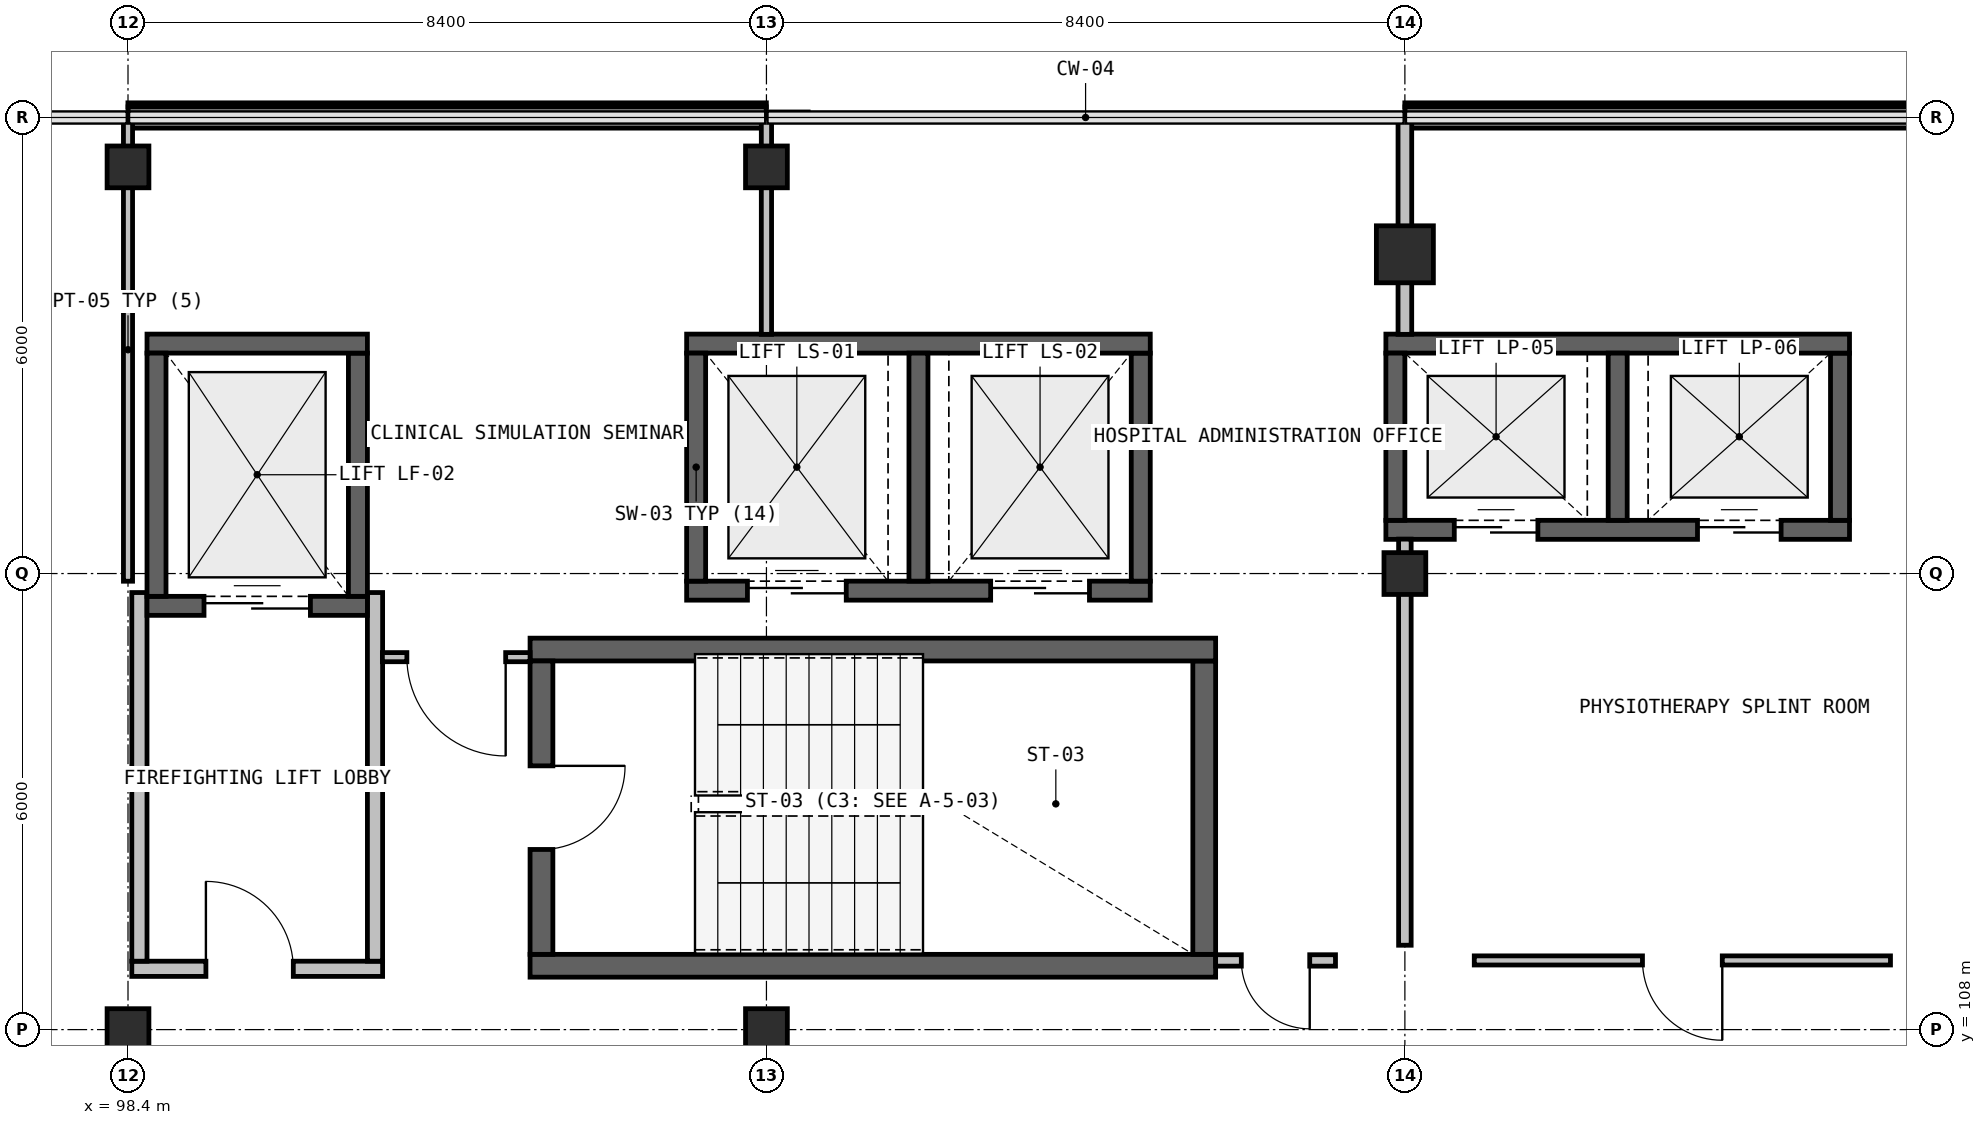
"""IFC4 building model, lengths in metres.
Left out: names, types, materials, properties, quantities, classifications, styles, units other than length and angle.
Written with IfcOpenShell. Run it as: python <this file> out.ifc"""

import sys

from ifc_helpers import new_model, si_unit, direction, frame, frame_2d, origin, origin_2d, place, context, subcontext, project, spatial, rectangle, extrude, element, fill, save


model = new_model("IFC4")
c1 = context("Model", 3, precision=1e-05, world=origin(), true_north=direction((0.0, 1.0)))
c2 = subcontext(c1, "Body", "Model", "MODEL_VIEW")
j1 = project(units=[si_unit("LENGTHUNIT", "METRE"), si_unit("PLANEANGLEUNIT", "RADIAN")], contexts=[c1])
p1 = place(None, origin())
s1 = spatial("IfcSite", under=j1, at=p1, CompositionType="ELEMENT")
p2 = place(p1, origin())
s2 = spatial("IfcBuilding", under=s1, at=p2, CompositionType="ELEMENT")
p3 = place(p2, frame((0.0, 0.0, 31.35)))
s3 = spatial("IfcBuildingStorey", under=s2, at=p3, CompositionType="ELEMENT", Elevation=31.35)
p4 = place(p3, frame((115.2, 118.2, 0.0), z_axis=(0.0, 0.0, 1.0), x_axis=(1.0, 0.0, 0.0)))
e1 = element("IfcColumn", 1, at=p4, inside=s3, PredefinedType="COLUMN", context=c2, shape_type="SweptSolid", body=[
    extrude(rectangle(XDim=0.75, YDim=0.75, at=origin_2d()), origin(), (0.0, 0.0, 1.0), 4.05),
])
for number, where, z_axis, x_axis in (
    (2, (98.4, 108.0, 0.0), (0.0, 0.0, 1.0), (1.0, 0.0, 0.0)),
    (3, (98.4, 119.35, 0.0), (0.0, 0.0, 1.0), (1.0, 0.0, 0.0)),
    (4, (106.8, 108.0, 0.0), (0.0, 0.0, 1.0), (1.0, 0.0, 0.0)),
    (5, (106.8, 119.35, 0.0), (0.0, 0.0, 1.0), (1.0, 0.0, 0.0)),
    (6, (115.2, 114.0, 0.0), (0.0, 0.0, 1.0), (1.0, 0.0, 0.0)),
):
    element("IfcColumn", number, at=place(p3, frame(where, z_axis=z_axis, x_axis=x_axis)), inside=s3, PredefinedType="COLUMN", context=c2, shape_type="SweptSolid", body=[
        extrude(rectangle(XDim=0.55, YDim=0.55, at=origin_2d()), origin(), (0.0, 0.0, 1.0), 4.05),
    ])
p5 = place(p3, frame((98.401, 120.0, 0.0), z_axis=(0.0, 0.0, 1.0), x_axis=(1.0, 0.0, 0.0)))
e7 = element("IfcWall", 7, at=p5, inside=s3, PredefinedType="SOLIDWALL", context=c2, shape_type="SweptSolid", body=[
    extrude(rectangle(XDim=8.396, YDim=0.28, at=frame_2d((4.198, 0.0))), origin(), (0.0, 0.0, 1.0), 0.94),
])
p6 = place(p3, frame((115.201, 120.0, 0.0), z_axis=(0.0, 0.0, 1.0), x_axis=(1.0, 0.0, 0.0)))
e8 = element("IfcWall", 8, at=p6, inside=s3, PredefinedType="SOLIDWALL", context=c2, shape_type="SweptSolid", body=[
    extrude(rectangle(XDim=8.396, YDim=0.28, at=frame_2d((4.198, 0.0))), origin(), (0.0, 0.0, 1.0), 0.94),
])
p7 = place(p3, frame((98.45, 108.8, 0.0), z_axis=(0.0, 0.0, 1.0), x_axis=(1.0, 0.0, 0.0)))
e9 = element("IfcWall", 9, at=p7, inside=s3, PredefinedType="SOLIDWALL", context=c2, shape_type="SweptSolid", body=[
    extrude(rectangle(XDim=3.3, YDim=0.2, at=frame_2d((1.65, 0.0))), origin(), (0.0, 0.0, 1.0), 3.785),
])
p8 = place(p7, frame((0.975, 0.0, 0.0)))
e10 = element("IfcOpeningElement", 10, at=p8, cuts=e9, PredefinedType="OPENING", context=c2, shape_type="SweptSolid", body=[
    extrude(rectangle(XDim=1.15, YDim=2.15, at=frame_2d((0.575, 1.075))), frame((0.0, 0.11, 0.0), z_axis=(0.0, -1.0, 0.0), x_axis=(1.0, 0.0, 0.0)), (0.0, 0.0, 1.0), 0.22),
])
p9 = place(p3, frame((101.65, 108.9, 0.0), z_axis=(0.0, 0.0, 1.0), x_axis=(0.0, 1.0, 0.0)))
e11 = element("IfcWall", 11, at=p9, inside=s3, PredefinedType="SOLIDWALL", context=c2, shape_type="SweptSolid", body=[
    extrude(rectangle(XDim=4.85, YDim=0.2, at=frame_2d((2.425, 0.0))), origin(), (0.0, 0.0, 1.0), 3.785),
])
p10 = place(p3, frame((98.55, 113.75, 0.0), z_axis=(0.0, 0.0, 1.0), x_axis=(0.0, -1.0, 0.0)))
e12 = element("IfcWall", 12, at=p10, inside=s3, PredefinedType="SOLIDWALL", context=c2, shape_type="SweptSolid", body=[
    extrude(rectangle(XDim=4.85, YDim=0.2, at=frame_2d((2.425, 0.0))), origin(), (0.0, 0.0, 1.0), 3.185),
])
p11 = place(p3, frame((103.69, 108.84, 0.0), z_axis=(0.0, 0.0, 1.0), x_axis=(1.0, 0.0, 0.0)))
e13 = element("IfcWall", 13, at=p11, inside=s3, PredefinedType="SHEAR", context=c2, shape_type="SweptSolid", body=[
    extrude(rectangle(XDim=9.02, YDim=0.3, at=frame_2d((4.51, 0.0))), origin(), (0.0, 0.0, 1.0), 3.785),
])
p12 = place(p3, frame((112.56, 108.99, 0.0), z_axis=(0.0, 0.0, 1.0), x_axis=(0.0, 1.0, 0.0)))
e14 = element("IfcWall", 14, at=p12, inside=s3, PredefinedType="SHEAR", context=c2, shape_type="SweptSolid", body=[
    extrude(rectangle(XDim=3.86, YDim=0.3, at=frame_2d((1.93, 0.0))), origin(), (0.0, 0.0, 1.0), 3.785),
])
p13 = place(p3, frame((112.71, 113.0, 0.0), z_axis=(0.0, 0.0, 1.0), x_axis=(-1.0, 0.0, 0.0)))
e15 = element("IfcWall", 15, at=p13, inside=s3, PredefinedType="SHEAR", context=c2, shape_type="SweptSolid", body=[
    extrude(rectangle(XDim=9.02, YDim=0.3, at=frame_2d((4.51, 0.0))), origin(), (0.0, 0.0, 1.0), 3.785),
])
p14 = place(p3, frame((103.84, 112.85, 0.0), z_axis=(0.0, 0.0, 1.0), x_axis=(0.0, -1.0, 0.0)))
e16 = element("IfcWall", 16, at=p14, inside=s3, PredefinedType="SHEAR", context=c2, shape_type="SweptSolid", body=[
    extrude(rectangle(XDim=3.86, YDim=0.3, at=frame_2d((1.93, 0.0))), origin(), (0.0, 0.0, 1.0), 3.785),
])
p15 = place(p14, frame((1.38, 0.0, 0.0)))
e17 = element("IfcOpeningElement", 17, at=p15, cuts=e16, PredefinedType="OPENING", context=c2, shape_type="SweptSolid", body=[
    extrude(rectangle(XDim=1.1, YDim=2.15, at=frame_2d((0.55, 1.075))), frame((0.0, 0.16, 0.0), z_axis=(0.0, -1.0, 0.0), x_axis=(1.0, 0.0, 0.0)), (0.0, 0.0, 1.0), 0.32),
])
p16 = place(p3, frame((98.65, 113.575, 0.0), z_axis=(0.0, 0.0, 1.0), x_axis=(1.0, 0.0, 0.0)))
e18 = element("IfcWall", 18, at=p16, inside=s3, PredefinedType="SHEAR", context=c2, shape_type="SweptSolid", body=[
    extrude(rectangle(XDim=2.9, YDim=0.25, at=frame_2d((1.45, 0.0))), origin(), (0.0, 0.0, 1.0), 3.785),
])
p17 = place(p16, frame((0.75, 0.0, 0.0)))
e19 = element("IfcOpeningElement", 19, at=p17, cuts=e18, PredefinedType="OPENING", context=c2, shape_type="SweptSolid", body=[
    extrude(rectangle(XDim=1.4, YDim=2.15, at=frame_2d((0.7, 1.075))), frame((0.0, 0.135, 0.0), z_axis=(0.0, -1.0, 0.0), x_axis=(1.0, 0.0, 0.0)), (0.0, 0.0, 1.0), 0.27),
])
p18 = place(p3, frame((101.425, 113.7, 0.0), z_axis=(0.0, 0.0, 1.0), x_axis=(0.0, 1.0, 0.0)))
e20 = element("IfcWall", 20, at=p18, inside=s3, PredefinedType="SHEAR", context=c2, shape_type="SweptSolid", body=[
    extrude(rectangle(XDim=3.2, YDim=0.25, at=frame_2d((1.6, 0.0))), origin(), (0.0, 0.0, 1.0), 3.785),
])
p19 = place(p3, frame((101.55, 117.025, 0.0), z_axis=(0.0, 0.0, 1.0), x_axis=(-1.0, 0.0, 0.0)))
e21 = element("IfcWall", 21, at=p19, inside=s3, PredefinedType="SHEAR", context=c2, shape_type="SweptSolid", body=[
    extrude(rectangle(XDim=2.9, YDim=0.25, at=frame_2d((1.45, 0.0))), origin(), (0.0, 0.0, 1.0), 3.785),
])
p20 = place(p3, frame((98.775, 116.9, 0.0), z_axis=(0.0, 0.0, 1.0), x_axis=(0.0, -1.0, 0.0)))
e22 = element("IfcWall", 22, at=p20, inside=s3, PredefinedType="SHEAR", context=c2, shape_type="SweptSolid", body=[
    extrude(rectangle(XDim=3.2, YDim=0.25, at=frame_2d((1.6, 0.0))), origin(), (0.0, 0.0, 1.0), 3.785),
])
p21 = place(p3, frame((105.75, 113.775, 0.0), z_axis=(0.0, 0.0, 1.0), x_axis=(1.0, 0.0, 0.0)))
e23 = element("IfcWall", 23, at=p21, inside=s3, PredefinedType="SHEAR", context=c2, shape_type="SweptSolid", body=[
    extrude(rectangle(XDim=6.1, YDim=0.25, at=frame_2d((3.05, 0.0))), origin(), (0.0, 0.0, 1.0), 3.785),
])
p22 = place(p21, frame((0.8, 0.0, 0.0)))
e24 = element("IfcOpeningElement", 24, at=p22, cuts=e23, PredefinedType="OPENING", context=c2, shape_type="SweptSolid", body=[
    extrude(rectangle(XDim=1.3, YDim=2.15, at=frame_2d((0.65, 1.075))), frame((0.0, 0.135, 0.0), z_axis=(0.0, -1.0, 0.0), x_axis=(1.0, 0.0, 0.0)), (0.0, 0.0, 1.0), 0.27),
])
p23 = place(p21, frame((4.0, 0.0, 0.0)))
e25 = element("IfcOpeningElement", 25, at=p23, cuts=e23, PredefinedType="OPENING", context=c2, shape_type="SweptSolid", body=[
    extrude(rectangle(XDim=1.3, YDim=2.15, at=frame_2d((0.65, 1.075))), frame((0.0, 0.135, 0.0), z_axis=(0.0, -1.0, 0.0), x_axis=(1.0, 0.0, 0.0)), (0.0, 0.0, 1.0), 0.27),
])
p24 = place(p3, frame((111.725, 113.9, 0.0), z_axis=(0.0, 0.0, 1.0), x_axis=(0.0, 1.0, 0.0)))
e26 = element("IfcWall", 26, at=p24, inside=s3, PredefinedType="SHEAR", context=c2, shape_type="SweptSolid", body=[
    extrude(rectangle(XDim=3.0, YDim=0.25, at=frame_2d((1.5, 0.0))), origin(), (0.0, 0.0, 1.0), 3.785),
])
p25 = place(p3, frame((111.85, 117.025, 0.0), z_axis=(0.0, 0.0, 1.0), x_axis=(-1.0, 0.0, 0.0)))
e27 = element("IfcWall", 27, at=p25, inside=s3, PredefinedType="SHEAR", context=c2, shape_type="SweptSolid", body=[
    extrude(rectangle(XDim=6.1, YDim=0.25, at=frame_2d((3.05, 0.0))), origin(), (0.0, 0.0, 1.0), 3.785),
])
for number, where, z_axis, x_axis in (
    (28, (105.875, 116.9, 0.0), (0.0, 0.0, 1.0), (0.0, -1.0, 0.0)),
    (29, (108.8, 113.9, 0.0), (0.0, 0.0, 1.0), (0.0, 1.0, 0.0)),
):
    element("IfcWall", number, at=place(p3, frame(where, z_axis=z_axis, x_axis=x_axis)), inside=s3, PredefinedType="SHEAR", context=c2, shape_type="SweptSolid", body=[
        extrude(rectangle(XDim=3.0, YDim=0.25, at=frame_2d((1.5, 0.0))), origin(), (0.0, 0.0, 1.0), 3.785),
    ])
p26 = place(p3, frame((114.95, 114.575, 0.0), z_axis=(0.0, 0.0, 1.0), x_axis=(1.0, 0.0, 0.0)))
e30 = element("IfcWall", 30, at=p26, inside=s3, PredefinedType="SHEAR", context=c2, shape_type="SweptSolid", body=[
    extrude(rectangle(XDim=6.1, YDim=0.25, at=frame_2d((3.05, 0.0))), origin(), (0.0, 0.0, 1.0), 3.785),
])
p27 = place(p26, frame((0.9, 0.0, 0.0)))
e31 = element("IfcOpeningElement", 31, at=p27, cuts=e30, PredefinedType="OPENING", context=c2, shape_type="SweptSolid", body=[
    extrude(rectangle(XDim=1.1, YDim=2.15, at=frame_2d((0.55, 1.075))), frame((0.0, 0.135, 0.0), z_axis=(0.0, -1.0, 0.0), x_axis=(1.0, 0.0, 0.0)), (0.0, 0.0, 1.0), 0.27),
])
p28 = place(p26, frame((4.1, 0.0, 0.0)))
e32 = element("IfcOpeningElement", 32, at=p28, cuts=e30, PredefinedType="OPENING", context=c2, shape_type="SweptSolid", body=[
    extrude(rectangle(XDim=1.1, YDim=2.15, at=frame_2d((0.55, 1.075))), frame((0.0, 0.135, 0.0), z_axis=(0.0, -1.0, 0.0), x_axis=(1.0, 0.0, 0.0)), (0.0, 0.0, 1.0), 0.27),
])
p29 = place(p3, frame((120.925, 114.7, 0.0), z_axis=(0.0, 0.0, 1.0), x_axis=(0.0, 1.0, 0.0)))
e33 = element("IfcWall", 33, at=p29, inside=s3, PredefinedType="SHEAR", context=c2, shape_type="SweptSolid", body=[
    extrude(rectangle(XDim=2.2, YDim=0.25, at=frame_2d((1.1, 0.0))), origin(), (0.0, 0.0, 1.0), 3.785),
])
p30 = place(p3, frame((121.05, 117.025, 0.0), z_axis=(0.0, 0.0, 1.0), x_axis=(-1.0, 0.0, 0.0)))
e34 = element("IfcWall", 34, at=p30, inside=s3, PredefinedType="SHEAR", context=c2, shape_type="SweptSolid", body=[
    extrude(rectangle(XDim=6.1, YDim=0.25, at=frame_2d((3.05, 0.0))), origin(), (0.0, 0.0, 1.0), 3.785),
])
for number, where, z_axis, x_axis in (
    (35, (115.075, 116.9, 0.0), (0.0, 0.0, 1.0), (0.0, -1.0, 0.0)),
    (36, (118.0, 114.7, 0.0), (0.0, 0.0, 1.0), (0.0, 1.0, 0.0)),
):
    element("IfcWall", number, at=place(p3, frame(where, z_axis=z_axis, x_axis=x_axis)), inside=s3, PredefinedType="SHEAR", context=c2, shape_type="SweptSolid", body=[
        extrude(rectangle(XDim=2.2, YDim=0.25, at=frame_2d((1.1, 0.0))), origin(), (0.0, 0.0, 1.0), 3.785),
    ])
p31 = place(p3, frame((98.4, 119.99, 0.0), z_axis=(0.0, 0.0, 1.0), x_axis=(0.0, -1.0, 0.0)))
e37 = element("IfcWall", 37, at=p31, inside=s3, PredefinedType="PARTITIONING", context=c2, shape_type="SweptSolid", body=[
    extrude(rectangle(XDim=6.091, YDim=0.12, at=frame_2d((3.045, 0.0))), origin(), (0.0, 0.0, 1.0), 3.185),
])
p32 = place(p3, frame((106.8, 119.99, 0.0), z_axis=(0.0, 0.0, 1.0), x_axis=(0.0, -1.0, 0.0)))
e38 = element("IfcWall", 38, at=p32, inside=s3, PredefinedType="PARTITIONING", context=c2, shape_type="SweptSolid", body=[
    extrude(rectangle(XDim=2.843, YDim=0.135, at=frame_2d((1.421, 0.0))), origin(), (0.0, 0.0, 1.0), 3.785),
])
p33 = place(p3, frame((103.69, 112.9, 0.0), z_axis=(0.0, 0.0, 1.0), x_axis=(-1.0, 0.0, 0.0)))
e39 = element("IfcWall", 39, at=p33, inside=s3, PredefinedType="PARTITIONING", context=c2, shape_type="SweptSolid", body=[
    extrude(rectangle(XDim=1.943, YDim=0.12, at=frame_2d((0.971, 0.0))), origin(), (0.0, 0.0, 1.0), 3.785),
])
p34 = place(p33, frame((0.321, 0.0, 0.0)))
e40 = element("IfcOpeningElement", 40, at=p34, cuts=e39, PredefinedType="OPENING", context=c2, shape_type="SweptSolid", body=[
    extrude(rectangle(XDim=1.3, YDim=2.15, at=frame_2d((0.65, 1.075))), frame((0.0, 0.07, 0.0), z_axis=(0.0, -1.0, 0.0), x_axis=(1.0, 0.0, 0.0)), (0.0, 0.0, 1.0), 0.14),
])
p35 = place(p3, frame((115.2, 119.99, 0.0), z_axis=(0.0, 0.0, 1.0), x_axis=(0.0, -1.0, 0.0)))
e41 = element("IfcWall", 41, at=p35, inside=s3, PredefinedType="PARTITIONING", context=c2, shape_type="SweptSolid", body=[
    extrude(rectangle(XDim=2.843, YDim=0.18, at=frame_2d((1.421, 0.0))), origin(), (0.0, 0.0, 1.0), 3.785),
])
p36 = place(p3, frame((115.2, 114.453, 0.0), z_axis=(0.0, 0.0, 1.0), x_axis=(0.0, -1.0, 0.0)))
e42 = element("IfcWall", 42, at=p36, inside=s3, PredefinedType="PARTITIONING", context=c2, shape_type="SweptSolid", body=[
    extrude(rectangle(XDim=5.343, YDim=0.165, at=frame_2d((2.671, 0.0))), origin(), (0.0, 0.0, 1.0), 3.185),
])
p37 = place(p3, frame((114.287, 108.91, 0.0), z_axis=(0.0, 0.0, 1.0), x_axis=(-1.0, 0.0, 0.0)))
e43 = element("IfcWall", 43, at=p37, inside=s3, PredefinedType="PARTITIONING", context=c2, shape_type="SweptSolid", body=[
    extrude(rectangle(XDim=1.577, YDim=0.15, at=frame_2d((0.789, 0.0))), origin(), (0.0, 0.0, 1.0), 3.785),
])
p38 = place(p37, frame((0.339, 0.0, 0.0)))
e44 = element("IfcOpeningElement", 44, at=p38, cuts=e43, PredefinedType="OPENING", context=c2, shape_type="SweptSolid", body=[
    extrude(rectangle(XDim=0.9, YDim=2.1, at=frame_2d((0.45, 1.05))), frame((0.0, 0.085, 0.0), z_axis=(0.0, -1.0, 0.0), x_axis=(1.0, 0.0, 0.0)), (0.0, 0.0, 1.0), 0.17),
])
p39 = place(p3, frame((121.589, 108.91, 0.0), z_axis=(0.0, 0.0, 1.0), x_axis=(-1.0, 0.0, 0.0)))
e45 = element("IfcWall", 45, at=p39, inside=s3, PredefinedType="PARTITIONING", context=c2, shape_type="SweptSolid", body=[
    extrude(rectangle(XDim=5.476, YDim=0.12, at=frame_2d((2.738, 0.0))), origin(), (0.0, 0.0, 1.0), 3.785),
])
p40 = place(p39, frame((2.213, 0.0, 0.0)))
e46 = element("IfcOpeningElement", 46, at=p40, cuts=e45, PredefinedType="OPENING", context=c2, shape_type="SweptSolid", body=[
    extrude(rectangle(XDim=1.05, YDim=2.15, at=frame_2d((0.525, 1.075))), frame((0.0, 0.07, 0.0), z_axis=(0.0, -1.0, 0.0), x_axis=(1.0, 0.0, 0.0)), (0.0, 0.0, 1.0), 0.14),
])
p41 = place(p8, origin())
e47 = element("IfcDoor", 47, at=p41, inside=s3, OperationType="SINGLE_SWING_LEFT", PredefinedType="DOOR", context=c2, shape_type="SweptSolid", body=[
    extrude(rectangle(XDim=1.15, YDim=2.15, at=frame_2d((0.575, 1.075))), frame((0.0, 0.025, 0.0), z_axis=(0.0, -1.0, 0.0), x_axis=(1.0, 0.0, 0.0)), (0.0, 0.0, 1.0), 0.05),
])
fill(e10, e47)
p42 = place(p15, origin())
e48 = element("IfcDoor", 48, at=p42, inside=s3, OperationType="SINGLE_SWING_LEFT", PredefinedType="DOOR", context=c2, shape_type="SweptSolid", body=[
    extrude(rectangle(XDim=1.1, YDim=2.15, at=frame_2d((0.55, 1.075))), frame((0.0, 0.025, 0.0), z_axis=(0.0, -1.0, 0.0), x_axis=(1.0, 0.0, 0.0)), (0.0, 0.0, 1.0), 0.05),
])
fill(e17, e48)
p43 = place(p17, origin())
e49 = element("IfcDoor", 49, at=p43, inside=s3, OperationType="DOUBLE_DOOR_SLIDING", PredefinedType="DOOR", context=c2, shape_type="SweptSolid", body=[
    extrude(rectangle(XDim=1.4, YDim=2.15, at=frame_2d((0.7, 1.075))), frame((0.0, 0.025, 0.0), z_axis=(0.0, -1.0, 0.0), x_axis=(1.0, 0.0, 0.0)), (0.0, 0.0, 1.0), 0.05),
])
fill(e19, e49)
p44 = place(p22, origin())
e50 = element("IfcDoor", 50, at=p44, inside=s3, OperationType="DOUBLE_DOOR_SLIDING", PredefinedType="DOOR", context=c2, shape_type="SweptSolid", body=[
    extrude(rectangle(XDim=1.3, YDim=2.15, at=frame_2d((0.65, 1.075))), frame((0.0, 0.025, 0.0), z_axis=(0.0, -1.0, 0.0), x_axis=(1.0, 0.0, 0.0)), (0.0, 0.0, 1.0), 0.05),
])
fill(e24, e50)
p45 = place(p23, origin())
e51 = element("IfcDoor", 51, at=p45, inside=s3, OperationType="DOUBLE_DOOR_SLIDING", PredefinedType="DOOR", context=c2, shape_type="SweptSolid", body=[
    extrude(rectangle(XDim=1.3, YDim=2.15, at=frame_2d((0.65, 1.075))), frame((0.0, 0.025, 0.0), z_axis=(0.0, -1.0, 0.0), x_axis=(1.0, 0.0, 0.0)), (0.0, 0.0, 1.0), 0.05),
])
fill(e25, e51)
p46 = place(p27, origin())
e52 = element("IfcDoor", 52, at=p46, inside=s3, OperationType="DOUBLE_DOOR_SLIDING", PredefinedType="DOOR", context=c2, shape_type="SweptSolid", body=[
    extrude(rectangle(XDim=1.1, YDim=2.15, at=frame_2d((0.55, 1.075))), frame((0.0, 0.025, 0.0), z_axis=(0.0, -1.0, 0.0), x_axis=(1.0, 0.0, 0.0)), (0.0, 0.0, 1.0), 0.05),
])
fill(e31, e52)
p47 = place(p28, origin())
e53 = element("IfcDoor", 53, at=p47, inside=s3, OperationType="DOUBLE_DOOR_SLIDING", PredefinedType="DOOR", context=c2, shape_type="SweptSolid", body=[
    extrude(rectangle(XDim=1.1, YDim=2.15, at=frame_2d((0.55, 1.075))), frame((0.0, 0.025, 0.0), z_axis=(0.0, -1.0, 0.0), x_axis=(1.0, 0.0, 0.0)), (0.0, 0.0, 1.0), 0.05),
])
fill(e32, e53)
p48 = place(p34, origin())
e54 = element("IfcDoor", 54, at=p48, inside=s3, OperationType="SINGLE_SWING_RIGHT", PredefinedType="DOOR", context=c2, shape_type="SweptSolid", body=[
    extrude(rectangle(XDim=1.3, YDim=2.15, at=frame_2d((0.65, 1.075))), frame((0.0, 0.025, 0.0), z_axis=(0.0, -1.0, 0.0), x_axis=(1.0, 0.0, 0.0)), (0.0, 0.0, 1.0), 0.05),
])
fill(e40, e54)
p49 = place(p38, origin())
e55 = element("IfcDoor", 55, at=p49, inside=s3, OperationType="SINGLE_SWING_LEFT", PredefinedType="DOOR", context=c2, shape_type="SweptSolid", body=[
    extrude(rectangle(XDim=0.9, YDim=2.1, at=frame_2d((0.45, 1.05))), frame((0.0, 0.025, 0.0), z_axis=(0.0, -1.0, 0.0), x_axis=(1.0, 0.0, 0.0)), (0.0, 0.0, 1.0), 0.05),
])
fill(e44, e55)
p50 = place(p40, origin())
e56 = element("IfcDoor", 56, at=p50, inside=s3, OperationType="SINGLE_SWING_RIGHT", PredefinedType="DOOR", context=c2, shape_type="SweptSolid", body=[
    extrude(rectangle(XDim=1.05, YDim=2.15, at=frame_2d((0.525, 1.075))), frame((0.0, 0.025, 0.0), z_axis=(0.0, -1.0, 0.0), x_axis=(1.0, 0.0, 0.0)), (0.0, 0.0, 1.0), 0.05),
])
fill(e46, e56)
save(model, sys.argv[1])
